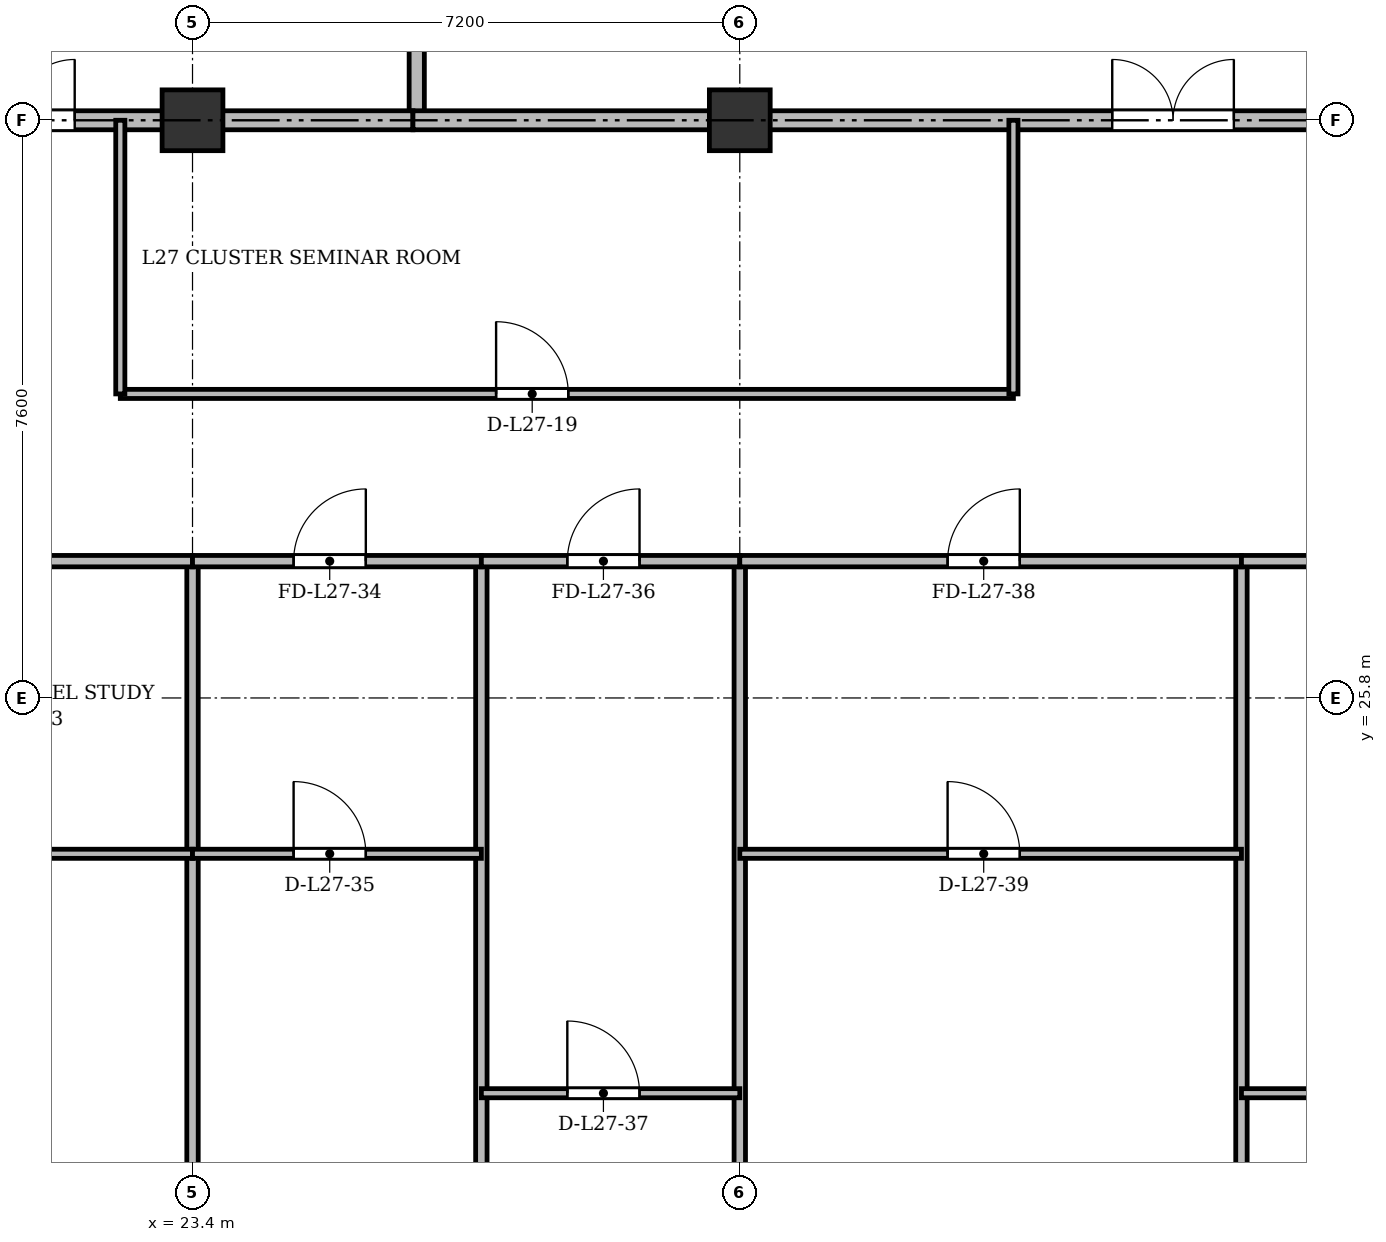
"""IFC4 building model, lengths in metres.
Left out: names, types, materials, properties, quantities, classifications, styles, units other than length and angle.
Written with IfcOpenShell. Run it as: python <this file> out.ifc"""

import sys

from ifc_helpers import new_model, si_unit, direction, frame, frame_2d, origin, origin_2d, place, context, subcontext, project, spatial, rectangle, extrude, source, transform, mapped, element, fill, save


model = new_model("IFC4")
c1 = context("Model", 3, precision=1e-05, world=origin(), true_north=direction((0.0, 1.0)))
c2 = subcontext(c1, "Body", "Model", "MODEL_VIEW")
j1 = project(units=[si_unit("LENGTHUNIT", "METRE"), si_unit("PLANEANGLEUNIT", "RADIAN")], contexts=[c1])
p1 = place(None, origin())
s1 = spatial("IfcSite", under=j1, at=p1, CompositionType="ELEMENT")
p2 = place(p1, origin())
s2 = spatial("IfcBuilding", under=s1, at=p2, CompositionType="ELEMENT")
p3 = place(p2, frame((0.0, 0.0, 106.9)))
s3 = spatial("IfcBuildingStorey", under=s2, at=p3, CompositionType="ELEMENT", Elevation=106.9)
m1 = source(origin(), c2, "Body", "SweptSolid", [
    extrude(rectangle(XDim=0.8, YDim=0.8, at=origin_2d()), origin(), (0.0, 0.0, 1.0), 3.6),
])
for number, where, z_axis, x_axis in (
    (1, (23.4, 33.4, 0.0), (0.0, 0.0, 1.0), (1.0, 0.0, 0.0)),
    (2, (30.6, 33.4, 0.0), (0.0, 0.0, 1.0), (1.0, 0.0, 0.0)),
):
    element("IfcColumn", number, at=place(p3, frame(where, z_axis=z_axis, x_axis=x_axis)), inside=s3, PredefinedType="COLUMN", context=c2, shape_type="MappedRepresentation", body=[
        mapped(m1, transform((0.0, 0.0, 0.0), x_axis=(1.0, 0.0, 0.0), y_axis=(0.0, 1.0, 0.0), z_axis=(0.0, 0.0, 1.0), scale=1.0)),
    ])
p4 = place(p3, frame((26.35, 33.4, 0.0), z_axis=(0.0, 0.0, 1.0), x_axis=(0.0, 1.0, 0.0)))
e3 = element("IfcWall", 3, at=p4, inside=s3, PredefinedType="SOLIDWALL", context=c2, shape_type="SweptSolid", body=[
    extrude(rectangle(XDim=11.3, YDim=0.2, at=frame_2d((5.65, 0.0))), origin(), (0.0, 0.0, 1.0), 2.752),
])
p5 = place(p3, frame((19.5, 33.4, 0.0), z_axis=(0.0, 0.0, 1.0), x_axis=(1.0, 0.0, 0.0)))
e4 = element("IfcWall", 4, at=p5, inside=s3, PredefinedType="PARTITIONING", context=c2, shape_type="SweptSolid", body=[
    extrude(rectangle(XDim=6.8, YDim=0.25, at=frame_2d((3.4, 0.0))), origin(), (0.0, 0.0, 1.0), 2.752),
])
p6 = place(p5, frame((0.75, 0.0, 0.0)))
e5 = element("IfcOpeningElement", 5, at=p6, cuts=e4, PredefinedType="OPENING", context=c2, shape_type="SweptSolid", body=[
    extrude(rectangle(XDim=1.6, YDim=2.2, at=frame_2d((0.8, 1.1))), frame((0.0, 0.135, 0.0), z_axis=(0.0, -1.0, 0.0), x_axis=(1.0, 0.0, 0.0)), (0.0, 0.0, 1.0), 0.27),
])
p7 = place(p3, frame((26.3, 33.4, 0.0), z_axis=(0.0, 0.0, 1.0), x_axis=(1.0, 0.0, 0.0)))
e6 = element("IfcWall", 6, at=p7, inside=s3, PredefinedType="PARTITIONING", context=c2, shape_type="SweptSolid", body=[
    extrude(rectangle(XDim=20.85, YDim=0.25, at=frame_2d((10.425, 0.0))), origin(), (0.0, 0.0, 1.0), 2.752),
])
p8 = place(p7, frame((9.2, 0.0, 0.0)))
e7 = element("IfcOpeningElement", 7, at=p8, cuts=e6, PredefinedType="OPENING", context=c2, shape_type="SweptSolid", body=[
    extrude(rectangle(XDim=1.6, YDim=2.2, at=frame_2d((0.8, 1.1))), frame((0.0, 0.135, 0.0), z_axis=(0.0, -1.0, 0.0), x_axis=(1.0, 0.0, 0.0)), (0.0, 0.0, 1.0), 0.27),
])
p9 = place(p3, frame((22.45, 29.8, 0.0), z_axis=(0.0, 0.0, 1.0), x_axis=(1.0, 0.0, 0.0)))
e8 = element("IfcWall", 8, at=p9, inside=s3, PredefinedType="PARTITIONING", context=c2, shape_type="SweptSolid", body=[
    extrude(rectangle(XDim=11.75, YDim=0.12, at=frame_2d((5.875, 0.0))), origin(), (0.0, 0.0, 1.0), 2.84),
])
p10 = place(p9, frame((4.944, 0.0, 0.0)))
e9 = element("IfcOpeningElement", 9, at=p10, cuts=e8, PredefinedType="OPENING", context=c2, shape_type="SweptSolid", body=[
    extrude(rectangle(XDim=0.95, YDim=2.15, at=frame_2d((0.475, 1.075))), frame((0.0, 0.07, 0.0), z_axis=(0.0, -1.0, 0.0), x_axis=(1.0, 0.0, 0.0)), (0.0, 0.0, 1.0), 0.14),
])
for number, where, z_axis, x_axis in (
    (10, (22.45, 29.8, 0.0), (0.0, 0.0, 1.0), (0.0, 1.0, 0.0)),
    (11, (34.2, 29.8, 0.0), (0.0, 0.0, 1.0), (0.0, 1.0, 0.0)),
):
    element("IfcWall", number, at=place(p3, frame(where, z_axis=z_axis, x_axis=x_axis)), inside=s3, PredefinedType="PARTITIONING", context=c2, shape_type="SweptSolid", body=[
        extrude(rectangle(XDim=3.6, YDim=0.12, at=frame_2d((1.8, 0.0))), origin(), (0.0, 0.0, 1.0), 2.752),
    ])
p11 = place(p3, frame((23.4, 3.145, 0.0), z_axis=(0.0, 0.0, 1.0), x_axis=(0.0, 1.0, 0.0)))
e12 = element("IfcWall", 12, at=p11, inside=s3, PredefinedType="PARTITIONING", context=c2, shape_type="SweptSolid", body=[
    extrude(rectangle(XDim=24.455, YDim=0.15, at=frame_2d((12.228, 0.0))), origin(), (0.0, 0.0, 1.0), 2.84),
])
p12 = place(p3, frame((27.2, 3.145, 0.0), z_axis=(0.0, 0.0, 1.0), x_axis=(0.0, 1.0, 0.0)))
e13 = element("IfcWall", 13, at=p12, inside=s3, PredefinedType="PARTITIONING", context=c2, shape_type="SweptSolid", body=[
    extrude(rectangle(XDim=24.455, YDim=0.15, at=frame_2d((12.228, 0.0))), origin(), (0.0, 0.0, 1.0), 2.752),
])
p13 = place(p3, frame((30.6, 3.145, 0.0), z_axis=(0.0, 0.0, 1.0), x_axis=(0.0, 1.0, 0.0)))
e14 = element("IfcWall", 14, at=p13, inside=s3, PredefinedType="PARTITIONING", context=c2, shape_type="SweptSolid", body=[
    extrude(rectangle(XDim=24.455, YDim=0.15, at=frame_2d((12.228, 0.0))), origin(), (0.0, 0.0, 1.0), 2.84),
])
p14 = place(p3, frame((37.2, 3.145, 0.0), z_axis=(0.0, 0.0, 1.0), x_axis=(0.0, 1.0, 0.0)))
e15 = element("IfcWall", 15, at=p14, inside=s3, PredefinedType="PARTITIONING", context=c2, shape_type="SweptSolid", body=[
    extrude(rectangle(XDim=24.455, YDim=0.15, at=frame_2d((12.228, 0.0))), origin(), (0.0, 0.0, 1.0), 2.752),
])
p15 = place(p3, frame((15.6, 27.6, 0.0), z_axis=(0.0, 0.0, 1.0), x_axis=(1.0, 0.0, 0.0)))
e16 = element("IfcWall", 16, at=p15, inside=s3, PredefinedType="PARTITIONING", context=c2, shape_type="SweptSolid", body=[
    extrude(rectangle(XDim=7.8, YDim=0.15, at=frame_2d((3.9, 0.0))), origin(), (0.0, 0.0, 1.0), 2.84),
])
p16 = place(p15, frame((3.333, 0.0, 0.0)))
e17 = element("IfcOpeningElement", 17, at=p16, cuts=e16, PredefinedType="OPENING", context=c2, shape_type="SweptSolid", body=[
    extrude(rectangle(XDim=0.95, YDim=2.15, at=frame_2d((0.475, 1.075))), frame((0.0, 0.085, 0.0), z_axis=(0.0, -1.0, 0.0), x_axis=(1.0, 0.0, 0.0)), (0.0, 0.0, 1.0), 0.17),
])
p17 = place(p3, frame((15.6, 23.75, 0.0), z_axis=(0.0, 0.0, 1.0), x_axis=(1.0, 0.0, 0.0)))
e18 = element("IfcWall", 18, at=p17, inside=s3, PredefinedType="PARTITIONING", context=c2, shape_type="SweptSolid", body=[
    extrude(rectangle(XDim=7.8, YDim=0.12, at=frame_2d((3.9, 0.0))), origin(), (0.0, 0.0, 1.0), 2.84),
])
p18 = place(p17, frame((3.333, 0.0, 0.0)))
e19 = element("IfcOpeningElement", 19, at=p18, cuts=e18, PredefinedType="OPENING", context=c2, shape_type="SweptSolid", body=[
    extrude(rectangle(XDim=0.95, YDim=2.15, at=frame_2d((0.475, 1.075))), frame((0.0, 0.07, 0.0), z_axis=(0.0, -1.0, 0.0), x_axis=(1.0, 0.0, 0.0)), (0.0, 0.0, 1.0), 0.14),
])
p19 = place(p3, frame((23.4, 27.6, 0.0), z_axis=(0.0, 0.0, 1.0), x_axis=(1.0, 0.0, 0.0)))
e20 = element("IfcWall", 20, at=p19, inside=s3, PredefinedType="PARTITIONING", context=c2, shape_type="SweptSolid", body=[
    extrude(rectangle(XDim=3.8, YDim=0.15, at=frame_2d((1.9, 0.0))), origin(), (0.0, 0.0, 1.0), 2.84),
])
p20 = place(p19, frame((1.33, 0.0, 0.0)))
e21 = element("IfcOpeningElement", 21, at=p20, cuts=e20, PredefinedType="OPENING", context=c2, shape_type="SweptSolid", body=[
    extrude(rectangle(XDim=0.95, YDim=2.15, at=frame_2d((0.475, 1.075))), frame((0.0, 0.085, 0.0), z_axis=(0.0, -1.0, 0.0), x_axis=(1.0, 0.0, 0.0)), (0.0, 0.0, 1.0), 0.17),
])
p21 = place(p3, frame((23.4, 23.75, 0.0), z_axis=(0.0, 0.0, 1.0), x_axis=(1.0, 0.0, 0.0)))
e22 = element("IfcWall", 22, at=p21, inside=s3, PredefinedType="PARTITIONING", context=c2, shape_type="SweptSolid", body=[
    extrude(rectangle(XDim=3.8, YDim=0.12, at=frame_2d((1.9, 0.0))), origin(), (0.0, 0.0, 1.0), 2.84),
])
p22 = place(p21, frame((1.33, 0.0, 0.0)))
e23 = element("IfcOpeningElement", 23, at=p22, cuts=e22, PredefinedType="OPENING", context=c2, shape_type="SweptSolid", body=[
    extrude(rectangle(XDim=0.95, YDim=2.15, at=frame_2d((0.475, 1.075))), frame((0.0, 0.07, 0.0), z_axis=(0.0, -1.0, 0.0), x_axis=(1.0, 0.0, 0.0)), (0.0, 0.0, 1.0), 0.14),
])
p23 = place(p3, frame((27.2, 27.6, 0.0), z_axis=(0.0, 0.0, 1.0), x_axis=(1.0, 0.0, 0.0)))
e24 = element("IfcWall", 24, at=p23, inside=s3, PredefinedType="PARTITIONING", context=c2, shape_type="SweptSolid", body=[
    extrude(rectangle(XDim=3.4, YDim=0.15, at=frame_2d((1.7, 0.0))), origin(), (0.0, 0.0, 1.0), 2.84),
])
p24 = place(p23, frame((1.131, 0.0, 0.0)))
e25 = element("IfcOpeningElement", 25, at=p24, cuts=e24, PredefinedType="OPENING", context=c2, shape_type="SweptSolid", body=[
    extrude(rectangle(XDim=0.95, YDim=2.15, at=frame_2d((0.475, 1.075))), frame((0.0, 0.085, 0.0), z_axis=(0.0, -1.0, 0.0), x_axis=(1.0, 0.0, 0.0)), (0.0, 0.0, 1.0), 0.17),
])
p25 = place(p3, frame((27.2, 20.6, 0.0), z_axis=(0.0, 0.0, 1.0), x_axis=(1.0, 0.0, 0.0)))
e26 = element("IfcWall", 26, at=p25, inside=s3, PredefinedType="PARTITIONING", context=c2, shape_type="SweptSolid", body=[
    extrude(rectangle(XDim=3.4, YDim=0.12, at=frame_2d((1.7, 0.0))), origin(), (0.0, 0.0, 1.0), 2.84),
])
p26 = place(p25, frame((1.131, 0.0, 0.0)))
e27 = element("IfcOpeningElement", 27, at=p26, cuts=e26, PredefinedType="OPENING", context=c2, shape_type="SweptSolid", body=[
    extrude(rectangle(XDim=0.95, YDim=2.15, at=frame_2d((0.475, 1.075))), frame((0.0, 0.07, 0.0), z_axis=(0.0, -1.0, 0.0), x_axis=(1.0, 0.0, 0.0)), (0.0, 0.0, 1.0), 0.14),
])
p27 = place(p3, frame((30.6, 27.6, 0.0), z_axis=(0.0, 0.0, 1.0), x_axis=(1.0, 0.0, 0.0)))
e28 = element("IfcWall", 28, at=p27, inside=s3, PredefinedType="PARTITIONING", context=c2, shape_type="SweptSolid", body=[
    extrude(rectangle(XDim=6.6, YDim=0.15, at=frame_2d((3.3, 0.0))), origin(), (0.0, 0.0, 1.0), 2.84),
])
p28 = place(p27, frame((2.734, 0.0, 0.0)))
e29 = element("IfcOpeningElement", 29, at=p28, cuts=e28, PredefinedType="OPENING", context=c2, shape_type="SweptSolid", body=[
    extrude(rectangle(XDim=0.95, YDim=2.15, at=frame_2d((0.475, 1.075))), frame((0.0, 0.085, 0.0), z_axis=(0.0, -1.0, 0.0), x_axis=(1.0, 0.0, 0.0)), (0.0, 0.0, 1.0), 0.17),
])
p29 = place(p3, frame((30.6, 23.75, 0.0), z_axis=(0.0, 0.0, 1.0), x_axis=(1.0, 0.0, 0.0)))
e30 = element("IfcWall", 30, at=p29, inside=s3, PredefinedType="PARTITIONING", context=c2, shape_type="SweptSolid", body=[
    extrude(rectangle(XDim=6.6, YDim=0.12, at=frame_2d((3.3, 0.0))), origin(), (0.0, 0.0, 1.0), 2.84),
])
p30 = place(p29, frame((2.734, 0.0, 0.0)))
e31 = element("IfcOpeningElement", 31, at=p30, cuts=e30, PredefinedType="OPENING", context=c2, shape_type="SweptSolid", body=[
    extrude(rectangle(XDim=0.95, YDim=2.15, at=frame_2d((0.475, 1.075))), frame((0.0, 0.07, 0.0), z_axis=(0.0, -1.0, 0.0), x_axis=(1.0, 0.0, 0.0)), (0.0, 0.0, 1.0), 0.14),
])
p31 = place(p3, frame((37.2, 27.6, 0.0), z_axis=(0.0, 0.0, 1.0), x_axis=(1.0, 0.0, 0.0)))
e32 = element("IfcWall", 32, at=p31, inside=s3, PredefinedType="PARTITIONING", context=c2, shape_type="SweptSolid", body=[
    extrude(rectangle(XDim=6.6, YDim=0.15, at=frame_2d((3.3, 0.0))), origin(), (0.0, 0.0, 1.0), 2.84),
])
p32 = place(p31, frame((2.734, 0.0, 0.0)))
e33 = element("IfcOpeningElement", 33, at=p32, cuts=e32, PredefinedType="OPENING", context=c2, shape_type="SweptSolid", body=[
    extrude(rectangle(XDim=0.95, YDim=2.15, at=frame_2d((0.475, 1.075))), frame((0.0, 0.085, 0.0), z_axis=(0.0, -1.0, 0.0), x_axis=(1.0, 0.0, 0.0)), (0.0, 0.0, 1.0), 0.17),
])
p33 = place(p3, frame((37.2, 20.6, 0.0), z_axis=(0.0, 0.0, 1.0), x_axis=(1.0, 0.0, 0.0)))
e34 = element("IfcWall", 34, at=p33, inside=s3, PredefinedType="PARTITIONING", context=c2, shape_type="SweptSolid", body=[
    extrude(rectangle(XDim=6.6, YDim=0.12, at=frame_2d((3.3, 0.0))), origin(), (0.0, 0.0, 1.0), 2.84),
])
p34 = place(p33, frame((2.734, 0.0, 0.0)))
e35 = element("IfcOpeningElement", 35, at=p34, cuts=e34, PredefinedType="OPENING", context=c2, shape_type="SweptSolid", body=[
    extrude(rectangle(XDim=0.95, YDim=2.15, at=frame_2d((0.475, 1.075))), frame((0.0, 0.07, 0.0), z_axis=(0.0, -1.0, 0.0), x_axis=(1.0, 0.0, 0.0)), (0.0, 0.0, 1.0), 0.14),
])
m2 = source(origin(), c2, "Body", "SweptSolid", [
    extrude(rectangle(XDim=1.6, YDim=2.2, at=frame_2d((0.8, 1.1))), frame((0.0, 0.025, 0.0), z_axis=(0.0, -1.0, 0.0), x_axis=(1.0, 0.0, 0.0)), (0.0, 0.0, 1.0), 0.05),
])
p35 = place(p6, origin())
e36 = element("IfcDoor", 36, at=p35, inside=s3, OperationType="DOUBLE_DOOR_SINGLE_SWING", PredefinedType="DOOR", context=c2, shape_type="MappedRepresentation", body=[
    mapped(m2, transform((0.0, 0.0, 0.0), x_axis=(1.0, 0.0, 0.0), y_axis=(0.0, 1.0, 0.0), z_axis=(0.0, 0.0, 1.0), scale=1.0)),
])
fill(e5, e36)
p36 = place(p8, origin())
e37 = element("IfcDoor", 37, at=p36, inside=s3, OperationType="DOUBLE_DOOR_SINGLE_SWING", PredefinedType="DOOR", context=c2, shape_type="MappedRepresentation", body=[
    mapped(m2, transform((0.0, 0.0, 0.0), x_axis=(1.0, 0.0, 0.0), y_axis=(0.0, 1.0, 0.0), z_axis=(0.0, 0.0, 1.0), scale=1.0)),
])
fill(e7, e37)
m3 = source(origin(), c2, "Body", "SweptSolid", [
    extrude(rectangle(XDim=0.95, YDim=2.15, at=frame_2d((0.475, 1.075))), frame((0.0, 0.025, 0.0), z_axis=(0.0, -1.0, 0.0), x_axis=(1.0, 0.0, 0.0)), (0.0, 0.0, 1.0), 0.05),
])
p37 = place(p10, origin())
e38 = element("IfcDoor", 38, at=p37, inside=s3, OperationType="SINGLE_SWING_LEFT", PredefinedType="DOOR", context=c2, shape_type="MappedRepresentation", body=[
    mapped(m3, transform((0.0, 0.0, 0.0), x_axis=(1.0, 0.0, 0.0), y_axis=(0.0, 1.0, 0.0), z_axis=(0.0, 0.0, 1.0), scale=1.0)),
])
fill(e9, e38)
p38 = place(p20, origin())
e39 = element("IfcDoor", 39, at=p38, inside=s3, OperationType="SINGLE_SWING_RIGHT", PredefinedType="DOOR", context=c2, shape_type="MappedRepresentation", body=[
    mapped(m3, transform((0.0, 0.0, 0.0), x_axis=(1.0, 0.0, 0.0), y_axis=(0.0, 1.0, 0.0), z_axis=(0.0, 0.0, 1.0), scale=1.0)),
])
fill(e21, e39)
p39 = place(p22, origin())
e40 = element("IfcDoor", 40, at=p39, inside=s3, OperationType="SINGLE_SWING_LEFT", PredefinedType="DOOR", context=c2, shape_type="MappedRepresentation", body=[
    mapped(m3, transform((0.0, 0.0, 0.0), x_axis=(1.0, 0.0, 0.0), y_axis=(0.0, 1.0, 0.0), z_axis=(0.0, 0.0, 1.0), scale=1.0)),
])
fill(e23, e40)
p40 = place(p24, origin())
e41 = element("IfcDoor", 41, at=p40, inside=s3, OperationType="SINGLE_SWING_RIGHT", PredefinedType="DOOR", context=c2, shape_type="MappedRepresentation", body=[
    mapped(m3, transform((0.0, 0.0, 0.0), x_axis=(1.0, 0.0, 0.0), y_axis=(0.0, 1.0, 0.0), z_axis=(0.0, 0.0, 1.0), scale=1.0)),
])
fill(e25, e41)
p41 = place(p26, origin())
e42 = element("IfcDoor", 42, at=p41, inside=s3, OperationType="SINGLE_SWING_LEFT", PredefinedType="DOOR", context=c2, shape_type="MappedRepresentation", body=[
    mapped(m3, transform((0.0, 0.0, 0.0), x_axis=(1.0, 0.0, 0.0), y_axis=(0.0, 1.0, 0.0), z_axis=(0.0, 0.0, 1.0), scale=1.0)),
])
fill(e27, e42)
p42 = place(p28, origin())
e43 = element("IfcDoor", 43, at=p42, inside=s3, OperationType="SINGLE_SWING_RIGHT", PredefinedType="DOOR", context=c2, shape_type="MappedRepresentation", body=[
    mapped(m3, transform((0.0, 0.0, 0.0), x_axis=(1.0, 0.0, 0.0), y_axis=(0.0, 1.0, 0.0), z_axis=(0.0, 0.0, 1.0), scale=1.0)),
])
fill(e29, e43)
p43 = place(p30, origin())
e44 = element("IfcDoor", 44, at=p43, inside=s3, OperationType="SINGLE_SWING_LEFT", PredefinedType="DOOR", context=c2, shape_type="MappedRepresentation", body=[
    mapped(m3, transform((0.0, 0.0, 0.0), x_axis=(1.0, 0.0, 0.0), y_axis=(0.0, 1.0, 0.0), z_axis=(0.0, 0.0, 1.0), scale=1.0)),
])
fill(e31, e44)
save(model, sys.argv[1])
